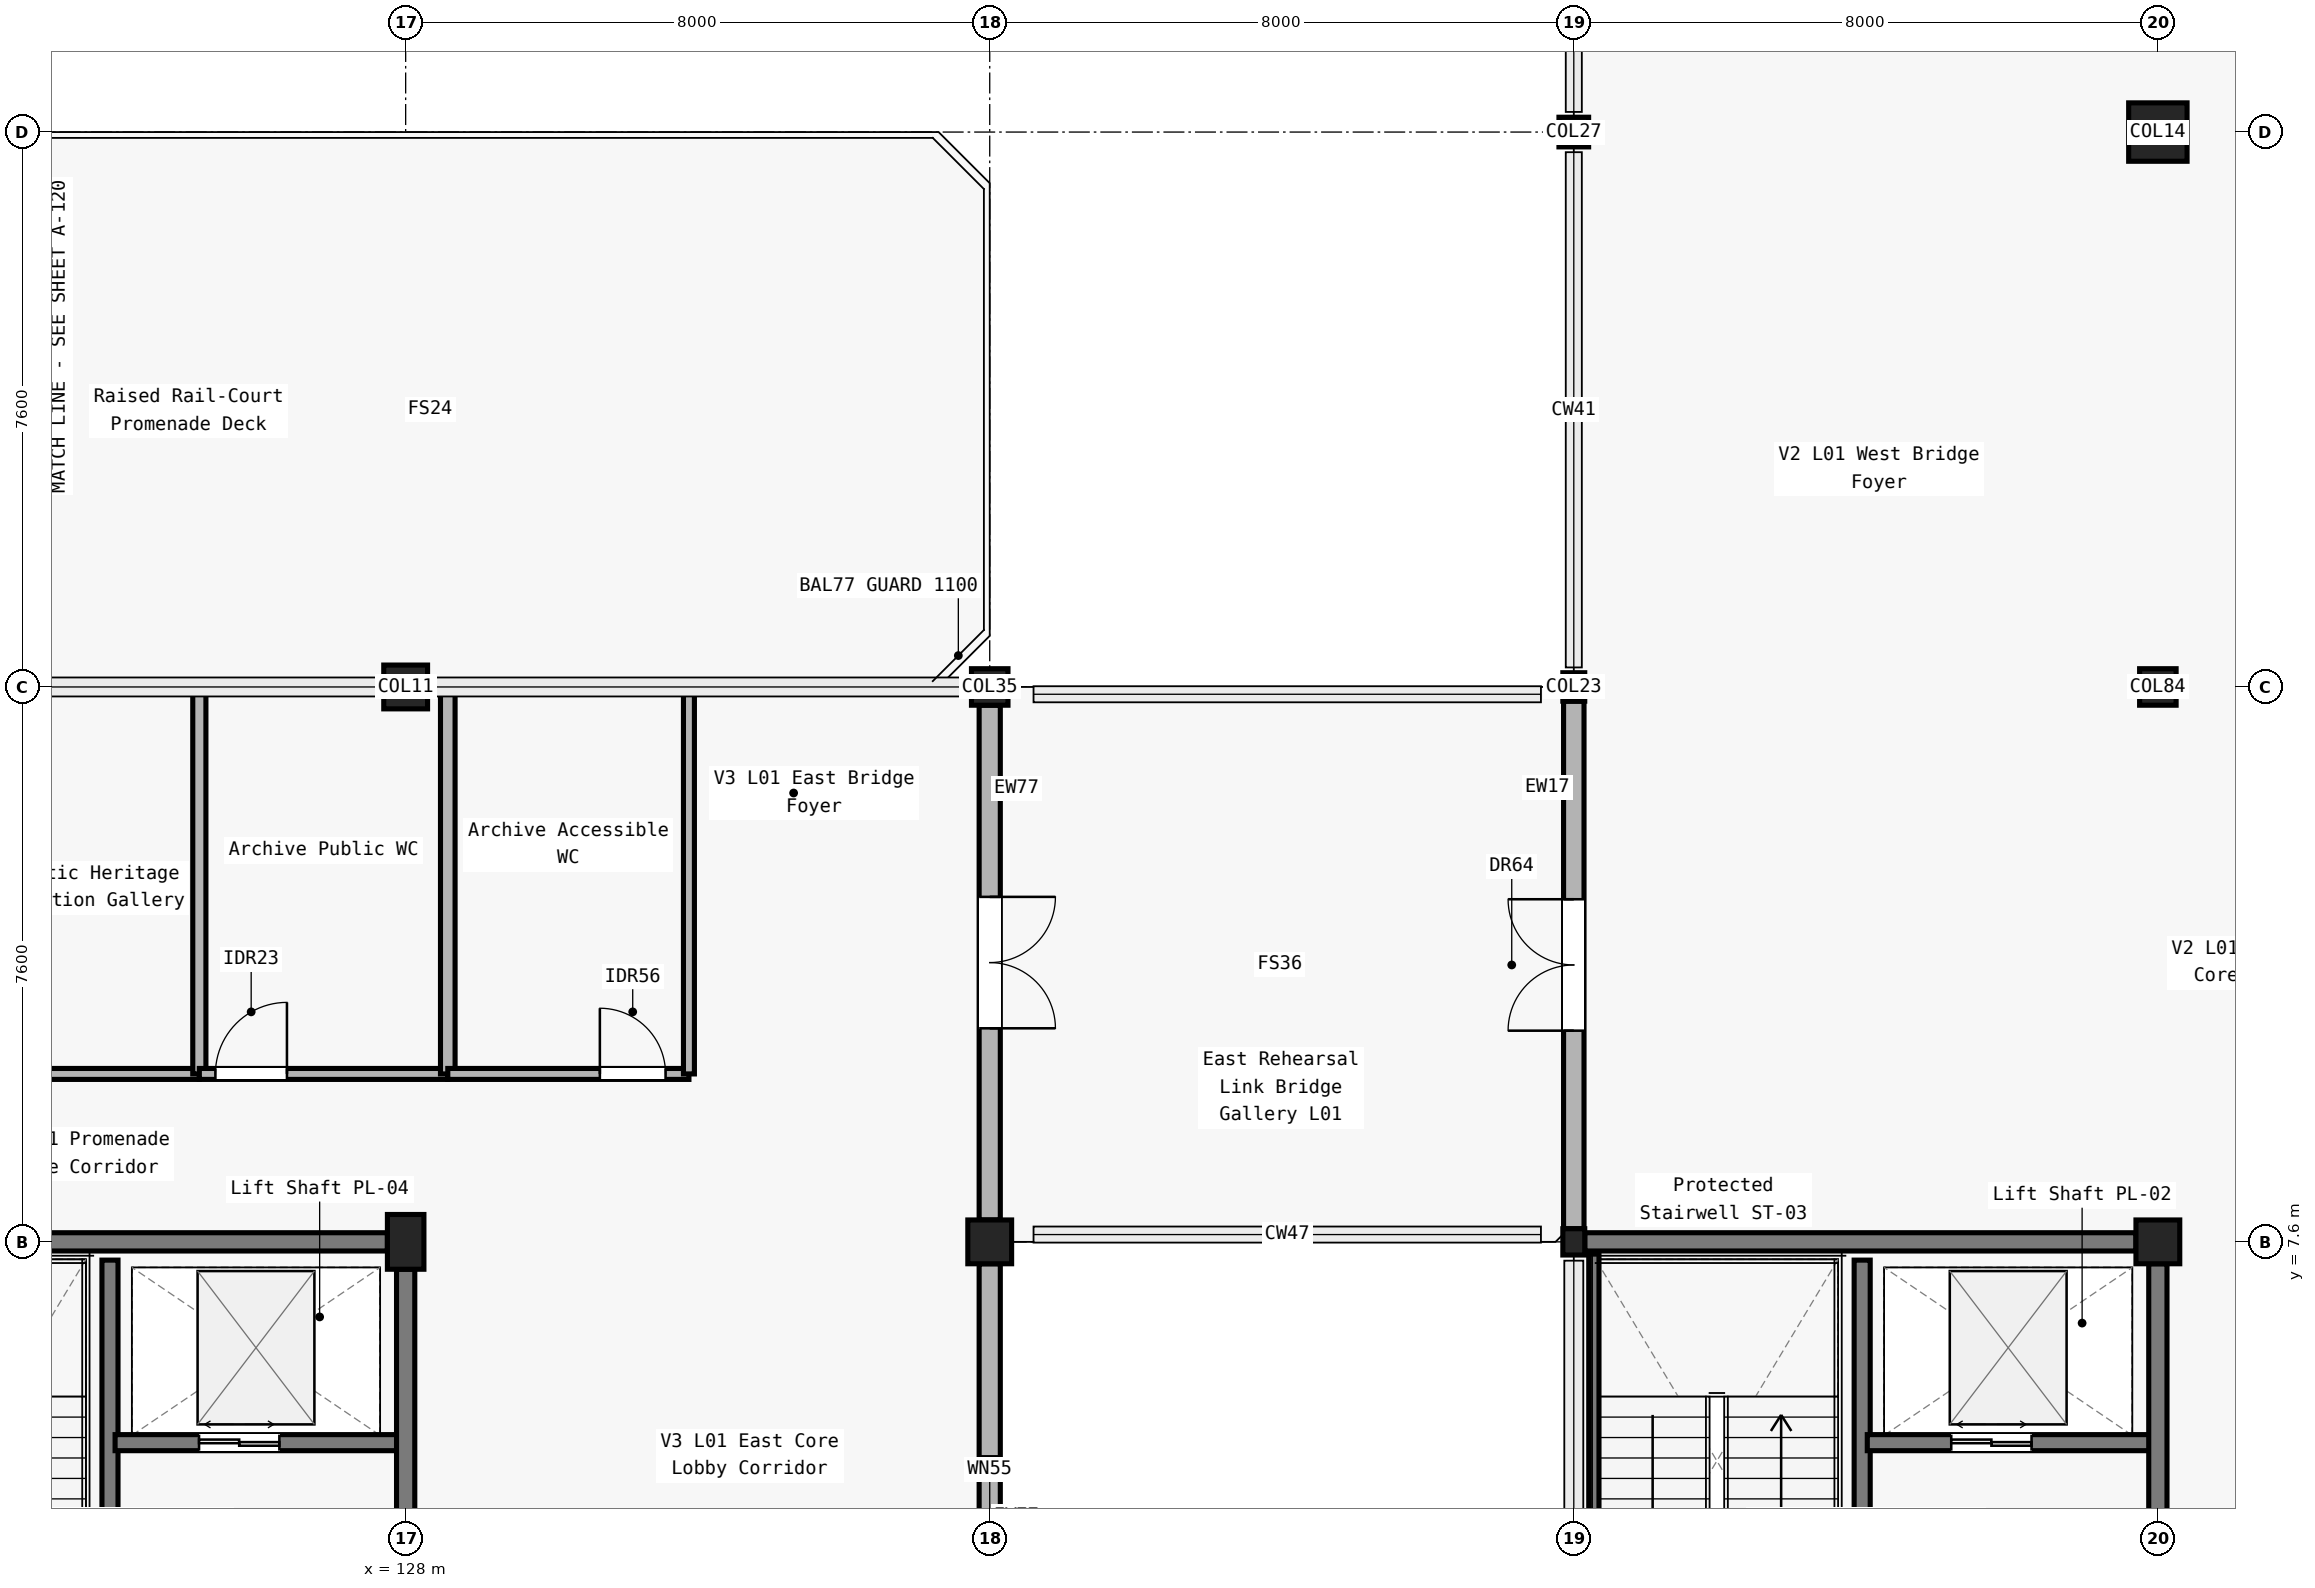
"""IFC4 building model, lengths in metres.
Left out: names, types, materials, properties, quantities, classifications, styles, units other than length and angle.
Written with IfcOpenShell. Run it as: python <this file> out.ifc"""

import sys

from ifc_helpers import new_model, si_unit, direction, frame, frame_2d, origin, origin_2d, place, context, subcontext, project, spatial, rectangle, circle, hollow_circle, i_section, extrude, element, fill, save


model = new_model("IFC4")
c1 = context("Model", 3, precision=1e-05, world=origin(), true_north=direction((0.0, 1.0)))
c2 = subcontext(c1, "Body", "Model", "MODEL_VIEW")
j1 = project(units=[si_unit("LENGTHUNIT", "METRE"), si_unit("PLANEANGLEUNIT", "RADIAN")], contexts=[c1])
p1 = place(None, origin())
s1 = spatial("IfcSite", under=j1, at=p1, CompositionType="ELEMENT")
p2 = place(p1, origin())
s2 = spatial("IfcBuilding", under=s1, at=p2, CompositionType="ELEMENT")
p3 = place(p2, frame((0.0, 0.0, 5.4)))
s3 = spatial("IfcBuildingStorey", under=s2, at=p3, CompositionType="ELEMENT", Elevation=5.4)
p4 = place(p3, frame((144.0, 7.6, 0.0), z_axis=(0.0, 0.0, 1.0), x_axis=(1.0, 0.0, 0.0)))
e1 = element("IfcColumn", 1, at=p4, inside=s3, PredefinedType="COLUMN", context=c2, shape_type="SweptSolid", body=[
    extrude(i_section(OverallWidth=0.3, OverallDepth=0.36, WebThickness=0.012, FlangeThickness=0.022, FilletRadius=0.027, at=origin_2d()), origin(), (0.0, 0.0, 1.0), 4.8),
])
p5 = place(p3, frame((144.0, 15.2, 0.0), z_axis=(0.0, 0.0, 1.0), x_axis=(1.0, 0.0, 0.0)))
e2 = element("IfcColumn", 2, at=p5, inside=s3, PredefinedType="COLUMN", context=c2, shape_type="SweptSolid", body=[
    extrude(i_section(OverallWidth=0.3, OverallDepth=0.39, WebThickness=0.011, FlangeThickness=0.019, FilletRadius=0.027, at=origin_2d()), origin(), (0.0, 0.0, 1.0), 4.8),
])
p6 = place(p3, frame((144.0, 22.8, 0.0), z_axis=(0.0, 0.0, 1.0), x_axis=(1.0, 0.0, 0.0)))
e3 = element("IfcColumn", 3, at=p6, inside=s3, PredefinedType="COLUMN", context=c2, shape_type="SweptSolid", body=[
    extrude(hollow_circle(Radius=0.203, WallThickness=0.02, at=origin_2d()), origin(), (0.0, 0.0, 1.0), 4.8),
])
p7 = place(p3, frame((152.0, 7.6, 0.0), z_axis=(0.0, 0.0, 1.0), x_axis=(1.0, 0.0, 0.0)))
e4 = element("IfcColumn", 4, at=p7, inside=s3, PredefinedType="COLUMN", context=c2, shape_type="SweptSolid", body=[
    extrude(rectangle(XDim=0.6, YDim=0.6, at=origin_2d()), origin(), (0.0, 0.0, 1.0), 4.8),
])
p8 = place(p3, frame((152.0, 15.2, 0.0), z_axis=(0.0, 0.0, 1.0), x_axis=(1.0, 0.0, 0.0)))
e5 = element("IfcColumn", 5, at=p8, inside=s3, PredefinedType="COLUMN", context=c2, shape_type="SweptSolid", body=[
    extrude(rectangle(XDim=0.5, YDim=0.5, at=origin_2d()), origin(), (0.0, 0.0, 1.0), 4.8),
])
p9 = place(p3, frame((152.0, 22.8, 0.0), z_axis=(0.0, 0.0, 1.0), x_axis=(1.0, 0.0, 0.0)))
e6 = element("IfcColumn", 6, at=p9, inside=s3, PredefinedType="COLUMN", context=c2, shape_type="SweptSolid", body=[
    extrude(circle(Radius=0.4, at=origin_2d()), origin(), (0.0, 0.0, 1.0), 4.8),
])
p10 = place(p3, frame((128.0, 7.6, 0.0), z_axis=(0.0, 0.0, 1.0), x_axis=(1.0, 0.0, 0.0)))
e7 = element("IfcColumn", 7, at=p10, inside=s3, PredefinedType="COLUMN", context=c2, shape_type="SweptSolid", body=[
    extrude(rectangle(XDim=0.5, YDim=0.75, at=origin_2d()), origin(), (0.0, 0.0, 1.0), 4.8),
])
for number, where, z_axis, x_axis in (
    (8, (128.0, 15.2, 0.0), (0.0, 0.0, 1.0), (1.0, 0.0, 0.0)),
    (9, (136.0, 7.6, 0.0), (0.0, 0.0, 1.0), (1.0, 0.0, 0.0)),
):
    element("IfcColumn", number, at=place(p3, frame(where, z_axis=z_axis, x_axis=x_axis)), inside=s3, PredefinedType="COLUMN", context=c2, shape_type="SweptSolid", body=[
        extrude(rectangle(XDim=0.6, YDim=0.6, at=origin_2d()), origin(), (0.0, 0.0, 1.0), 4.8),
    ])
p11 = place(p3, frame((136.0, 15.2, 0.0), z_axis=(0.0, 0.0, 1.0), x_axis=(1.0, 0.0, 0.0)))
e10 = element("IfcColumn", 10, at=p11, inside=s3, PredefinedType="COLUMN", context=c2, shape_type="SweptSolid", body=[
    extrude(rectangle(XDim=0.5, YDim=0.5, at=origin_2d()), origin(), (0.0, 0.0, 1.0), 4.8),
])
p12 = place(p3, frame((144.0, 7.78, 0.0), z_axis=(0.0, 0.0, 1.0), x_axis=(0.0, 1.0, 0.0)))
e11 = element("IfcWall", 11, at=p12, inside=s3, PredefinedType="SOLIDWALL", context=c2, shape_type="SweptSolid", body=[
    extrude(rectangle(XDim=7.225, YDim=0.28, at=frame_2d((3.612, 0.0))), origin(), (0.0, 0.0, 1.0), 3.85),
])
p13 = place(p12, frame((2.712, 0.0, 0.0)))
e12 = element("IfcOpeningElement", 12, at=p13, cuts=e11, PredefinedType="OPENING", context=c2, shape_type="SweptSolid", body=[
    extrude(rectangle(XDim=1.8, YDim=2.25, at=frame_2d((0.9, 1.125))), frame((0.0, 0.15, 0.0), z_axis=(0.0, -1.0, 0.0), x_axis=(1.0, 0.0, 0.0)), (0.0, 0.0, 1.0), 0.3),
])
p14 = place(p3, frame((136.0, 7.3, 0.0), z_axis=(0.0, 0.0, 1.0), x_axis=(0.0, -1.0, 0.0)))
e13 = element("IfcWall", 13, at=p14, inside=s3, PredefinedType="SOLIDWALL", context=c2, shape_type="SweptSolid", body=[
    extrude(rectangle(XDim=6.925, YDim=0.29, at=frame_2d((3.462, 0.0))), origin(), (0.0, 0.0, 1.0), 3.85),
])
p15 = place(p14, frame((2.637, 0.0, 0.95)))
e14 = element("IfcOpeningElement", 14, at=p15, cuts=e13, PredefinedType="OPENING", context=c2, shape_type="SweptSolid", body=[
    extrude(rectangle(XDim=1.65, YDim=1.5, at=frame_2d((0.825, 0.75))), frame((0.0, 0.155, 0.0), z_axis=(0.0, -1.0, 0.0), x_axis=(1.0, 0.0, 0.0)), (0.0, 0.0, 1.0), 0.31),
])
p16 = place(p3, frame((136.0, 14.95, 0.0), z_axis=(0.0, 0.0, 1.0), x_axis=(0.0, -1.0, 0.0)))
e15 = element("IfcWall", 15, at=p16, inside=s3, PredefinedType="SOLIDWALL", context=c2, shape_type="SweptSolid", body=[
    extrude(rectangle(XDim=7.05, YDim=0.29, at=frame_2d((3.525, 0.0))), origin(), (0.0, 0.0, 1.0), 3.85),
])
p17 = place(p16, frame((2.625, 0.0, 0.0)))
e16 = element("IfcOpeningElement", 16, at=p17, cuts=e15, PredefinedType="OPENING", context=c2, shape_type="SweptSolid", body=[
    extrude(rectangle(XDim=1.8, YDim=2.25, at=frame_2d((0.9, 1.125))), frame((0.0, 0.155, 0.0), z_axis=(0.0, -1.0, 0.0), x_axis=(1.0, 0.0, 0.0)), (0.0, 0.0, 1.0), 0.31),
])
p18 = place(p3, frame((144.15, 7.6, 0.0), z_axis=(0.0, 0.0, 1.0), x_axis=(1.0, 0.0, 0.0)))
e17 = element("IfcWall", 17, at=p18, inside=s3, PredefinedType="SOLIDWALL", context=c2, shape_type="SweptSolid", body=[
    extrude(rectangle(XDim=7.55, YDim=0.25, at=frame_2d((3.775, 0.0))), origin(), (0.0, 0.0, 1.0), 3.635),
])
p19 = place(p3, frame((147.95, 0.25, 0.0), z_axis=(0.0, 0.0, 1.0), x_axis=(0.0, 1.0, 0.0)))
e18 = element("IfcWall", 18, at=p19, inside=s3, PredefinedType="SOLIDWALL", context=c2, shape_type="SweptSolid", body=[
    extrude(rectangle(XDim=7.1, YDim=0.22, at=frame_2d((3.55, 0.0))), origin(), (0.0, 0.0, 1.0), 4.51),
])
p20 = place(p19, frame((0.35, 0.0, 0.0)))
e19 = element("IfcOpeningElement", 19, at=p20, cuts=e18, PredefinedType="OPENING", context=c2, shape_type="SweptSolid", body=[
    extrude(rectangle(XDim=1.2, YDim=2.15, at=frame_2d((0.6, 1.075))), frame((0.0, 0.12, 0.0), z_axis=(0.0, -1.0, 0.0), x_axis=(1.0, 0.0, 0.0)), (0.0, 0.0, 1.0), 0.24),
])
p21 = place(p3, frame((148.02, 4.85, 0.0), z_axis=(0.0, 0.0, 1.0), x_axis=(1.0, 0.0, 0.0)))
e20 = element("IfcWall", 20, at=p21, inside=s3, PredefinedType="SOLIDWALL", context=c2, shape_type="SweptSolid", body=[
    extrude(rectangle(XDim=3.93, YDim=0.22, at=frame_2d((1.965, 0.0))), origin(), (0.0, 0.0, 1.0), 3.885),
])
p22 = place(p21, frame((1.15, 0.0, 0.0)))
e21 = element("IfcOpeningElement", 21, at=p22, cuts=e20, PredefinedType="OPENING", context=c2, shape_type="SweptSolid", body=[
    extrude(rectangle(XDim=1.1, YDim=2.2, at=frame_2d((0.55, 1.1))), frame((0.0, 0.12, 0.0), z_axis=(0.0, -1.0, 0.0), x_axis=(1.0, 0.0, 0.0)), (0.0, 0.0, 1.0), 0.24),
])
p23 = place(p3, frame((152.0, 0.18, 0.0), z_axis=(0.0, 0.0, 1.0), x_axis=(0.0, 1.0, 0.0)))
e22 = element("IfcWall", 22, at=p23, inside=s3, PredefinedType="SOLIDWALL", context=c2, shape_type="SweptSolid", body=[
    extrude(rectangle(XDim=7.12, YDim=0.25, at=frame_2d((3.56, 0.0))), origin(), (0.0, 0.0, 1.0), 3.84),
])
p24 = place(p23, frame((2.17, 0.0, 0.0)))
e23 = element("IfcOpeningElement", 23, at=p24, cuts=e22, PredefinedType="OPENING", context=c2, shape_type="SweptSolid", body=[
    extrude(rectangle(XDim=1.35, YDim=2.2, at=frame_2d((0.675, 1.1))), frame((0.0, 0.135, 0.0), z_axis=(0.0, -1.0, 0.0), x_axis=(1.0, 0.0, 0.0)), (0.0, 0.0, 1.0), 0.27),
])
p25 = place(p3, frame((120.3, 7.6, 0.0), z_axis=(0.0, 0.0, 1.0), x_axis=(1.0, 0.0, 0.0)))
e24 = element("IfcWall", 24, at=p25, inside=s3, PredefinedType="SOLIDWALL", context=c2, shape_type="SweptSolid", body=[
    extrude(rectangle(XDim=7.45, YDim=0.25, at=frame_2d((3.725, 0.0))), origin(), (0.0, 0.0, 1.0), 2.69),
])
p26 = place(p3, frame((123.95, 0.25, 0.0), z_axis=(0.0, 0.0, 1.0), x_axis=(0.0, 1.0, 0.0)))
e25 = element("IfcWall", 25, at=p26, inside=s3, PredefinedType="SOLIDWALL", context=c2, shape_type="SweptSolid", body=[
    extrude(rectangle(XDim=7.1, YDim=0.22, at=frame_2d((3.55, 0.0))), origin(), (0.0, 0.0, 1.0), 4.51),
])
p27 = place(p26, frame((0.35, 0.0, 0.0)))
e26 = element("IfcOpeningElement", 26, at=p27, cuts=e25, PredefinedType="OPENING", context=c2, shape_type="SweptSolid", body=[
    extrude(rectangle(XDim=1.2, YDim=2.15, at=frame_2d((0.6, 1.075))), frame((0.0, 0.12, 0.0), z_axis=(0.0, -1.0, 0.0), x_axis=(1.0, 0.0, 0.0)), (0.0, 0.0, 1.0), 0.24),
])
p28 = place(p3, frame((124.02, 4.85, 0.0), z_axis=(0.0, 0.0, 1.0), x_axis=(1.0, 0.0, 0.0)))
e27 = element("IfcWall", 27, at=p28, inside=s3, PredefinedType="SOLIDWALL", context=c2, shape_type="SweptSolid", body=[
    extrude(rectangle(XDim=3.93, YDim=0.22, at=frame_2d((1.965, 0.0))), origin(), (0.0, 0.0, 1.0), 3.81),
])
p29 = place(p28, frame((1.15, 0.0, 0.0)))
e28 = element("IfcOpeningElement", 28, at=p29, cuts=e27, PredefinedType="OPENING", context=c2, shape_type="SweptSolid", body=[
    extrude(rectangle(XDim=1.1, YDim=2.2, at=frame_2d((0.55, 1.1))), frame((0.0, 0.12, 0.0), z_axis=(0.0, -1.0, 0.0), x_axis=(1.0, 0.0, 0.0)), (0.0, 0.0, 1.0), 0.24),
])
p30 = place(p3, frame((128.0, 0.45, 0.0), z_axis=(0.0, 0.0, 1.0), x_axis=(0.0, 1.0, 0.0)))
e29 = element("IfcWall", 29, at=p30, inside=s3, PredefinedType="SOLIDWALL", context=c2, shape_type="SweptSolid", body=[
    extrude(rectangle(XDim=6.775, YDim=0.25, at=frame_2d((3.388, 0.0))), origin(), (0.0, 0.0, 1.0), 2.69),
])
p31 = place(p30, frame((1.9, 0.0, 0.0)))
e30 = element("IfcOpeningElement", 30, at=p31, cuts=e29, PredefinedType="OPENING", context=c2, shape_type="SweptSolid", body=[
    extrude(rectangle(XDim=1.35, YDim=2.2, at=frame_2d((0.675, 1.1))), frame((0.0, 0.135, 0.0), z_axis=(0.0, -1.0, 0.0), x_axis=(1.0, 0.0, 0.0)), (0.0, 0.0, 1.0), 0.27),
])
p32 = place(p3, frame((106.156, 9.9, 0.0), z_axis=(0.0, 0.0, 1.0), x_axis=(1.0, 0.0, 0.0)))
e31 = element("IfcWall", 31, at=p32, inside=s3, PredefinedType="PARTITIONING", context=c2, shape_type="SweptSolid", body=[
    extrude(rectangle(XDim=19.018, YDim=0.15, at=frame_2d((9.509, 0.0))), origin(), (0.0, 0.0, 1.0), 3.81),
])
p33 = place(p32, frame((9.009, 0.0, 0.0)))
e32 = element("IfcOpeningElement", 32, at=p33, cuts=e31, PredefinedType="OPENING", context=c2, shape_type="SweptSolid", body=[
    extrude(rectangle(XDim=0.94, YDim=2.05, at=frame_2d((0.47, 1.025))), frame((0.0, 0.085, 0.0), z_axis=(0.0, -1.0, 0.0), x_axis=(1.0, 0.0, 0.0)), (0.0, 0.0, 1.0), 0.17),
])
p34 = place(p3, frame((125.174, 9.9, 0.0), z_axis=(0.0, 0.0, 1.0), x_axis=(0.0, 1.0, 0.0)))
e33 = element("IfcWall", 33, at=p34, inside=s3, PredefinedType="PARTITIONING", context=c2, shape_type="SweptSolid", body=[
    extrude(rectangle(XDim=5.22, YDim=0.18, at=frame_2d((2.61, 0.0))), origin(), (0.0, 0.0, 1.0), 3.88),
])
p35 = place(p3, frame((125.174, 9.9, 0.0), z_axis=(0.0, 0.0, 1.0), x_axis=(1.0, 0.0, 0.0)))
e34 = element("IfcWall", 34, at=p35, inside=s3, PredefinedType="PARTITIONING", context=c2, shape_type="SweptSolid", body=[
    extrude(rectangle(XDim=3.403, YDim=0.15, at=frame_2d((1.701, 0.0))), origin(), (0.0, 0.0, 1.0), 3.885),
])
p36 = place(p35, frame((0.22, 0.0, 0.0)))
e35 = element("IfcOpeningElement", 35, at=p36, cuts=e34, PredefinedType="OPENING", context=c2, shape_type="SweptSolid", body=[
    extrude(rectangle(XDim=0.98, YDim=2.05, at=frame_2d((0.49, 1.025))), frame((0.0, 0.085, 0.0), z_axis=(0.0, -1.0, 0.0), x_axis=(1.0, 0.0, 0.0)), (0.0, 0.0, 1.0), 0.17),
])
p37 = place(p3, frame((128.577, 9.9, 0.0), z_axis=(0.0, 0.0, 1.0), x_axis=(0.0, 1.0, 0.0)))
e36 = element("IfcWall", 36, at=p37, inside=s3, PredefinedType="PARTITIONING", context=c2, shape_type="SweptSolid", body=[
    extrude(rectangle(XDim=5.22, YDim=0.2, at=frame_2d((2.61, 0.0))), origin(), (0.0, 0.0, 1.0), 2.69),
])
p38 = place(p3, frame((128.577, 9.9, 0.0), z_axis=(0.0, 0.0, 1.0), x_axis=(1.0, 0.0, 0.0)))
e37 = element("IfcWall", 37, at=p38, inside=s3, PredefinedType="PARTITIONING", context=c2, shape_type="SweptSolid", body=[
    extrude(rectangle(XDim=3.303, YDim=0.15, at=frame_2d((1.651, 0.0))), origin(), (0.0, 0.0, 1.0), 3.895),
])
p39 = place(p38, frame((2.083, 0.0, 0.0)))
e38 = element("IfcOpeningElement", 38, at=p39, cuts=e37, PredefinedType="OPENING", context=c2, shape_type="SweptSolid", body=[
    extrude(rectangle(XDim=0.9, YDim=2.1, at=frame_2d((0.45, 1.05))), frame((0.0, 0.085, 0.0), z_axis=(0.0, -1.0, 0.0), x_axis=(1.0, 0.0, 0.0)), (0.0, 0.0, 1.0), 0.17),
])
p40 = place(p3, frame((131.88, 9.9, 0.0), z_axis=(0.0, 0.0, 1.0), x_axis=(0.0, 1.0, 0.0)))
e39 = element("IfcWall", 39, at=p40, inside=s3, PredefinedType="PARTITIONING", context=c2, shape_type="SweptSolid", body=[
    extrude(rectangle(XDim=5.22, YDim=0.15, at=frame_2d((2.61, 0.0))), origin(), (0.0, 0.0, 1.0), 2.69),
])
p41 = place(p3, frame((144.275, 0.15, 0.0), z_axis=(0.0, 0.0, 1.0), x_axis=(0.0, 1.0, 0.0)))
e40 = element("IfcWall", 40, at=p41, inside=s3, PredefinedType="SOLIDWALL", context=c2, shape_type="SweptSolid", body=[
    extrude(rectangle(XDim=7.3, YDim=0.14, at=frame_2d((3.65, 0.0))), origin(), (0.0, 0.0, 1.0), 4.51),
])
p42 = place(p13, origin())
e41 = element("IfcDoor", 41, at=p42, inside=s3, OperationType="DOUBLE_DOOR_SINGLE_SWING", PredefinedType="DOOR", context=c2, shape_type="SweptSolid", body=[
    extrude(rectangle(XDim=1.8, YDim=2.25, at=frame_2d((0.9, 1.125))), frame((0.0, 0.025, 0.0), z_axis=(0.0, -1.0, 0.0), x_axis=(1.0, 0.0, 0.0)), (0.0, 0.0, 1.0), 0.05),
])
fill(e12, e41)
p43 = place(p15, origin())
e42 = element("IfcWindow", 42, at=p43, inside=s3, PartitioningType="SINGLE_PANEL", PredefinedType="WINDOW", context=c2, shape_type="SweptSolid", body=[
    extrude(rectangle(XDim=1.65, YDim=1.5, at=frame_2d((0.825, 0.75))), frame((0.0, 0.03, 0.0), z_axis=(0.0, -1.0, 0.0), x_axis=(1.0, 0.0, 0.0)), (0.0, 0.0, 1.0), 0.06),
])
fill(e14, e42)
p44 = place(p17, origin())
e43 = element("IfcDoor", 43, at=p44, inside=s3, OperationType="DOUBLE_DOOR_SINGLE_SWING", PredefinedType="DOOR", context=c2, shape_type="SweptSolid", body=[
    extrude(rectangle(XDim=1.8, YDim=2.25, at=frame_2d((0.9, 1.125))), frame((0.0, 0.025, 0.0), z_axis=(0.0, -1.0, 0.0), x_axis=(1.0, 0.0, 0.0)), (0.0, 0.0, 1.0), 0.05),
])
fill(e16, e43)
p45 = place(p22, origin())
e44 = element("IfcDoor", 44, at=p45, inside=s3, OperationType="DOUBLE_DOOR_SLIDING", PredefinedType="DOOR", context=c2, shape_type="SweptSolid", body=[
    extrude(rectangle(XDim=1.1, YDim=2.2, at=frame_2d((0.55, 1.1))), frame((0.0, 0.025, 0.0), z_axis=(0.0, -1.0, 0.0), x_axis=(1.0, 0.0, 0.0)), (0.0, 0.0, 1.0), 0.05),
])
fill(e21, e44)
p46 = place(p29, origin())
e45 = element("IfcDoor", 45, at=p46, inside=s3, OperationType="DOUBLE_DOOR_SLIDING", PredefinedType="DOOR", context=c2, shape_type="SweptSolid", body=[
    extrude(rectangle(XDim=1.1, YDim=2.2, at=frame_2d((0.55, 1.1))), frame((0.0, 0.025, 0.0), z_axis=(0.0, -1.0, 0.0), x_axis=(1.0, 0.0, 0.0)), (0.0, 0.0, 1.0), 0.05),
])
fill(e28, e45)
p47 = place(p36, origin())
e46 = element("IfcDoor", 46, at=p47, inside=s3, OperationType="SINGLE_SWING_RIGHT", PredefinedType="DOOR", context=c2, shape_type="SweptSolid", body=[
    extrude(rectangle(XDim=0.98, YDim=2.05, at=frame_2d((0.49, 1.025))), frame((0.0, 0.025, 0.0), z_axis=(0.0, -1.0, 0.0), x_axis=(1.0, 0.0, 0.0)), (0.0, 0.0, 1.0), 0.05),
])
fill(e35, e46)
p48 = place(p39, origin())
e47 = element("IfcDoor", 47, at=p48, inside=s3, OperationType="SINGLE_SWING_LEFT", PredefinedType="DOOR", context=c2, shape_type="SweptSolid", body=[
    extrude(rectangle(XDim=0.9, YDim=2.1, at=frame_2d((0.45, 1.05))), frame((0.0, 0.025, 0.0), z_axis=(0.0, -1.0, 0.0), x_axis=(1.0, 0.0, 0.0)), (0.0, 0.0, 1.0), 0.05),
])
fill(e38, e47)
save(model, sys.argv[1])
